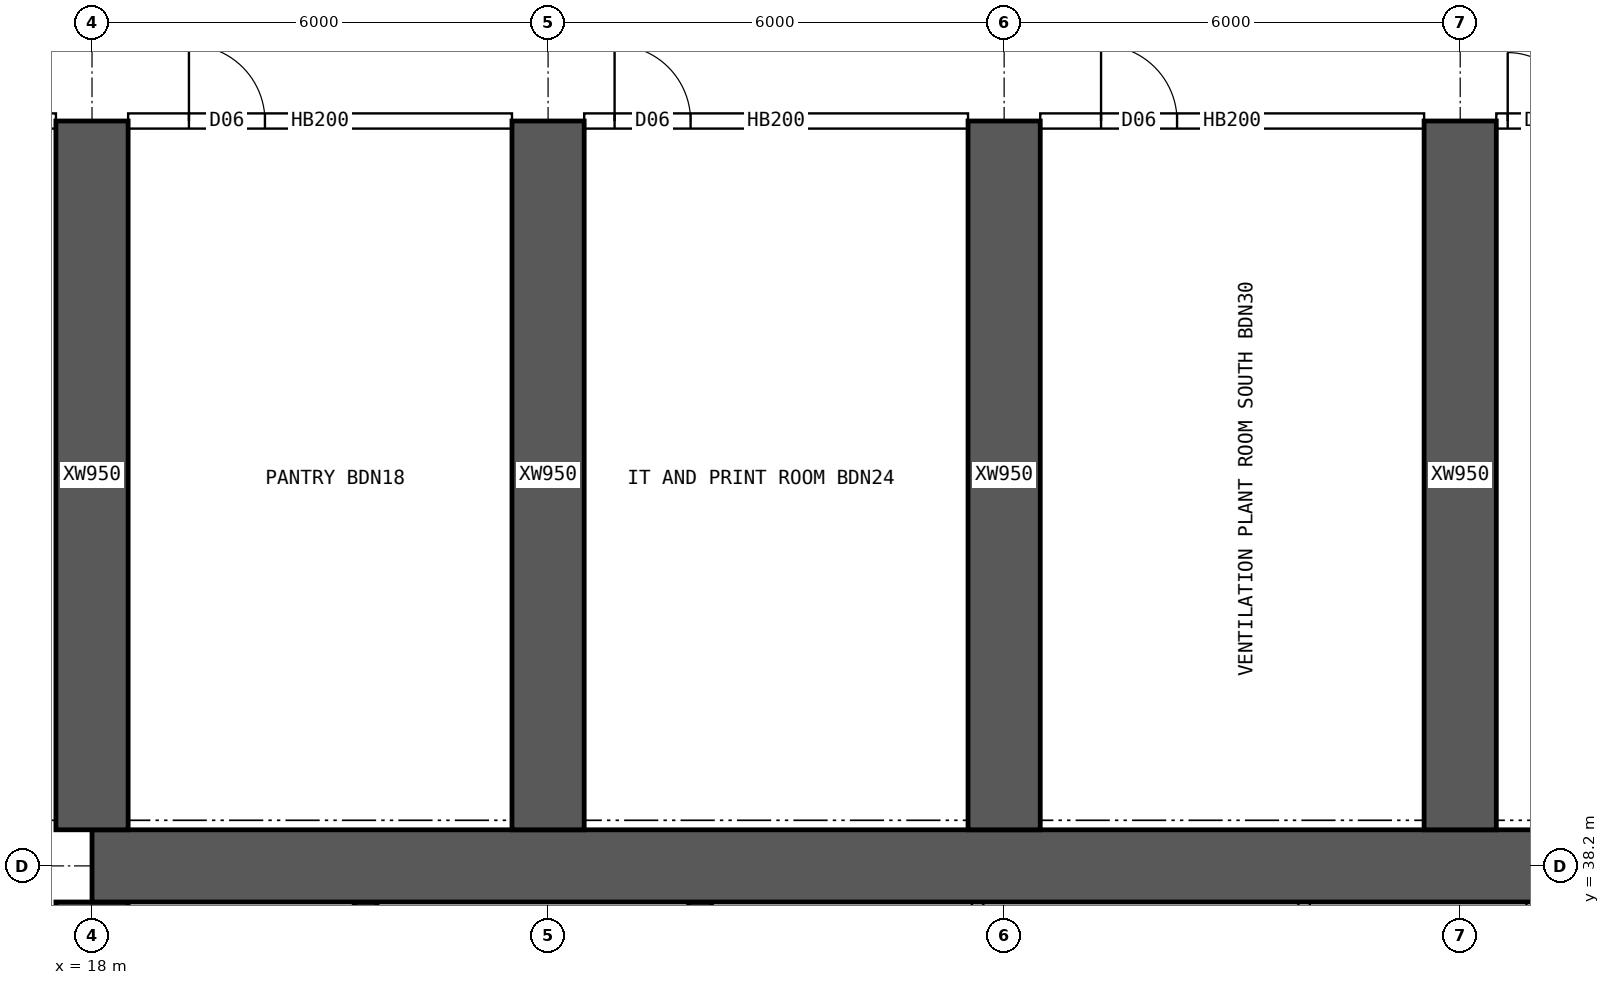
"""IFC4 building model, lengths in metres.
Left out: names, types, materials, properties, quantities, classifications, styles, units other than length and angle.
Written with IfcOpenShell. Run it as: python <this file> out.ifc"""

import sys

from ifc_helpers import new_model, si_unit, direction, frame, frame_2d, origin, place, context, subcontext, project, spatial, rectangle, extrude, element, fill, save


model = new_model("IFC4")
c1 = context("Model", 3, precision=1e-05, world=origin(), true_north=direction((0.0, 1.0)))
c2 = subcontext(c1, "Body", "Model", "MODEL_VIEW")
j1 = project(units=[si_unit("LENGTHUNIT", "METRE"), si_unit("PLANEANGLEUNIT", "RADIAN")], contexts=[c1])
p1 = place(None, origin())
s1 = spatial("IfcSite", under=j1, at=p1, CompositionType="ELEMENT")
p2 = place(p1, origin())
s2 = spatial("IfcBuilding", under=s1, at=p2, CompositionType="ELEMENT")
p3 = place(p2, frame((0.0, 0.0, 84.4)))
s3 = spatial("IfcBuildingStorey", under=s2, at=p3, CompositionType="ELEMENT", Elevation=84.4)
p4 = place(p3, frame((18.0, 38.2, 0.0), z_axis=(0.0, 0.0, 1.0), x_axis=(1.0, 0.0, 0.0)))
e1 = element("IfcWall", 1, at=p4, inside=s3, PredefinedType="SHEAR", context=c2, shape_type="SweptSolid", body=[
    extrude(rectangle(XDim=48.0, YDim=0.95, at=frame_2d((24.0, 0.0))), origin(), (0.0, 0.0, 1.0), 3.75),
])
p5 = place(p3, frame((18.0, 26.275, 0.0), z_axis=(0.0, 0.0, 1.0), x_axis=(0.0, 1.0, 0.0)))
e2 = element("IfcWall", 2, at=p5, inside=s3, PredefinedType="SHEAR", context=c2, shape_type="SweptSolid", body=[
    extrude(rectangle(XDim=11.45, YDim=0.95, at=frame_2d((5.725, 0.0))), origin(), (0.0, 0.0, 1.0), 3.75),
])
p6 = place(p5, frame((5.025, 0.0, 0.0)))
e3 = element("IfcOpeningElement", 3, at=p6, cuts=e2, PredefinedType="OPENING", context=c2, shape_type="SweptSolid", body=[
    extrude(rectangle(XDim=1.2, YDim=2.1, at=frame_2d((0.6, 1.05))), frame((0.0, 0.485, 0.0), z_axis=(0.0, -1.0, 0.0), x_axis=(1.0, 0.0, 0.0)), (0.0, 0.0, 1.0), 0.97),
])
for number, where, z_axis, x_axis in (
    (4, (21.6, 34.75, 0.0), (0.0, 0.0, 1.0), (0.0, 1.0, 0.0)),
    (5, (26.0, 34.75, 0.0), (0.0, 0.0, 1.0), (0.0, 1.0, 0.0)),
):
    element("IfcWall", number, at=place(p3, frame(where, z_axis=z_axis, x_axis=x_axis)), inside=s3, PredefinedType="SHEAR", context=c2, shape_type="SweptSolid", body=[
        extrude(rectangle(XDim=2.975, YDim=0.3, at=frame_2d((1.488, 0.0))), origin(), (0.0, 0.0, 1.0), 3.75),
    ])
for number, where, z_axis, x_axis in (
    (6, (18.0, 38.675, 0.0), (0.0, 0.0, 1.0), (0.0, 1.0, 0.0)),
    (7, (24.0, 38.675, 0.0), (0.0, 0.0, 1.0), (0.0, 1.0, 0.0)),
    (8, (30.0, 38.675, 0.0), (0.0, 0.0, 1.0), (0.0, 1.0, 0.0)),
    (9, (36.0, 38.675, 0.0), (0.0, 0.0, 1.0), (0.0, 1.0, 0.0)),
):
    element("IfcWall", number, at=place(p3, frame(where, z_axis=z_axis, x_axis=x_axis)), inside=s3, PredefinedType="SHEAR", context=c2, shape_type="SweptSolid", body=[
        extrude(rectangle(XDim=9.325, YDim=0.95, at=frame_2d((4.663, 0.0))), origin(), (0.0, 0.0, 1.0), 3.75),
    ])
for number, where, z_axis, x_axis in (
    (10, (29.651, 34.75, 0.0), (0.0, 0.0, 1.0), (0.0, 1.0, 0.0)),
    (11, (33.946, 34.75, 0.0), (0.0, 0.0, 1.0), (0.0, 1.0, 0.0)),
    (12, (36.946, 34.75, 0.0), (0.0, 0.0, 1.0), (0.0, 1.0, 0.0)),
):
    element("IfcWall", number, at=place(p3, frame(where, z_axis=z_axis, x_axis=x_axis)), inside=s3, PredefinedType="SOLIDWALL", context=c2, shape_type="SweptSolid", body=[
        extrude(rectangle(XDim=2.975, YDim=0.15, at=frame_2d((1.488, 0.0))), origin(), (0.0, 0.0, 1.0), 3.5),
    ])
p7 = place(p3, frame((12.475, 48.0, 0.0), z_axis=(0.0, 0.0, 1.0), x_axis=(1.0, 0.0, 0.0)))
e13 = element("IfcWall", 13, at=p7, inside=s3, PredefinedType="SOLIDWALL", context=c2, shape_type="SweptSolid", body=[
    extrude(rectangle(XDim=5.05, YDim=0.2, at=frame_2d((2.525, 0.0))), origin(), (0.0, 0.0, 1.0), 3.5),
])
p8 = place(p7, frame((3.325, 0.0, 0.0)))
e14 = element("IfcOpeningElement", 14, at=p8, cuts=e13, PredefinedType="OPENING", context=c2, shape_type="SweptSolid", body=[
    extrude(rectangle(XDim=1.6, YDim=2.1, at=frame_2d((0.8, 1.05))), frame((0.0, 0.11, 0.0), z_axis=(0.0, -1.0, 0.0), x_axis=(1.0, 0.0, 0.0)), (0.0, 0.0, 1.0), 0.22),
])
p9 = place(p3, frame((18.475, 48.0, 0.0), z_axis=(0.0, 0.0, 1.0), x_axis=(1.0, 0.0, 0.0)))
e15 = element("IfcWall", 15, at=p9, inside=s3, PredefinedType="SOLIDWALL", context=c2, shape_type="SweptSolid", body=[
    extrude(rectangle(XDim=5.05, YDim=0.2, at=frame_2d((2.525, 0.0))), origin(), (0.0, 0.0, 1.0), 3.5),
])
p10 = place(p9, frame((0.8, 0.0, 0.0)))
e16 = element("IfcOpeningElement", 16, at=p10, cuts=e15, PredefinedType="OPENING", context=c2, shape_type="SweptSolid", body=[
    extrude(rectangle(XDim=1.0, YDim=2.1, at=frame_2d((0.5, 1.05))), frame((0.0, 0.11, 0.0), z_axis=(0.0, -1.0, 0.0), x_axis=(1.0, 0.0, 0.0)), (0.0, 0.0, 1.0), 0.22),
])
p11 = place(p3, frame((24.475, 48.0, 0.0), z_axis=(0.0, 0.0, 1.0), x_axis=(1.0, 0.0, 0.0)))
e17 = element("IfcWall", 17, at=p11, inside=s3, PredefinedType="SOLIDWALL", context=c2, shape_type="SweptSolid", body=[
    extrude(rectangle(XDim=5.05, YDim=0.2, at=frame_2d((2.525, 0.0))), origin(), (0.0, 0.0, 1.0), 3.5),
])
p12 = place(p11, frame((0.4, 0.0, 0.0)))
e18 = element("IfcOpeningElement", 18, at=p12, cuts=e17, PredefinedType="OPENING", context=c2, shape_type="SweptSolid", body=[
    extrude(rectangle(XDim=1.0, YDim=2.1, at=frame_2d((0.5, 1.05))), frame((0.0, 0.11, 0.0), z_axis=(0.0, -1.0, 0.0), x_axis=(1.0, 0.0, 0.0)), (0.0, 0.0, 1.0), 0.22),
])
p13 = place(p3, frame((30.475, 48.0, 0.0), z_axis=(0.0, 0.0, 1.0), x_axis=(1.0, 0.0, 0.0)))
e19 = element("IfcWall", 19, at=p13, inside=s3, PredefinedType="SOLIDWALL", context=c2, shape_type="SweptSolid", body=[
    extrude(rectangle(XDim=5.05, YDim=0.2, at=frame_2d((2.525, 0.0))), origin(), (0.0, 0.0, 1.0), 3.5),
])
p14 = place(p13, frame((0.8, 0.0, 0.0)))
e20 = element("IfcOpeningElement", 20, at=p14, cuts=e19, PredefinedType="OPENING", context=c2, shape_type="SweptSolid", body=[
    extrude(rectangle(XDim=1.0, YDim=2.1, at=frame_2d((0.5, 1.05))), frame((0.0, 0.11, 0.0), z_axis=(0.0, -1.0, 0.0), x_axis=(1.0, 0.0, 0.0)), (0.0, 0.0, 1.0), 0.22),
])
p15 = place(p3, frame((36.475, 48.0, 0.0), z_axis=(0.0, 0.0, 1.0), x_axis=(1.0, 0.0, 0.0)))
e21 = element("IfcWall", 21, at=p15, inside=s3, PredefinedType="SOLIDWALL", context=c2, shape_type="SweptSolid", body=[
    extrude(rectangle(XDim=5.05, YDim=0.2, at=frame_2d((2.525, 0.0))), origin(), (0.0, 0.0, 1.0), 3.5),
])
p16 = place(p15, frame((0.15, 0.0, 0.0)))
e22 = element("IfcOpeningElement", 22, at=p16, cuts=e21, PredefinedType="OPENING", context=c2, shape_type="SweptSolid", body=[
    extrude(rectangle(XDim=0.9, YDim=2.1, at=frame_2d((0.45, 1.05))), frame((0.0, 0.11, 0.0), z_axis=(0.0, -1.0, 0.0), x_axis=(1.0, 0.0, 0.0)), (0.0, 0.0, 1.0), 0.22),
])
p17 = place(p15, frame((3.525, 0.0, 0.0)))
e23 = element("IfcOpeningElement", 23, at=p17, cuts=e21, PredefinedType="OPENING", context=c2, shape_type="SweptSolid", body=[
    extrude(rectangle(XDim=0.9, YDim=2.1, at=frame_2d((0.45, 1.05))), frame((0.0, 0.11, 0.0), z_axis=(0.0, -1.0, 0.0), x_axis=(1.0, 0.0, 0.0)), (0.0, 0.0, 1.0), 0.22),
])
p18 = place(p10, origin())
e24 = element("IfcDoor", 24, at=p18, inside=s3, OperationType="SINGLE_SWING_LEFT", PredefinedType="DOOR", context=c2, shape_type="SweptSolid", body=[
    extrude(rectangle(XDim=1.0, YDim=2.1, at=frame_2d((0.5, 1.05))), frame((0.0, 0.025, 0.0), z_axis=(0.0, -1.0, 0.0), x_axis=(1.0, 0.0, 0.0)), (0.0, 0.0, 1.0), 0.05),
])
fill(e16, e24)
p19 = place(p12, origin())
e25 = element("IfcDoor", 25, at=p19, inside=s3, OperationType="SINGLE_SWING_LEFT", PredefinedType="DOOR", context=c2, shape_type="SweptSolid", body=[
    extrude(rectangle(XDim=1.0, YDim=2.1, at=frame_2d((0.5, 1.05))), frame((0.0, 0.025, 0.0), z_axis=(0.0, -1.0, 0.0), x_axis=(1.0, 0.0, 0.0)), (0.0, 0.0, 1.0), 0.05),
])
fill(e18, e25)
p20 = place(p14, origin())
e26 = element("IfcDoor", 26, at=p20, inside=s3, OperationType="SINGLE_SWING_LEFT", PredefinedType="DOOR", context=c2, shape_type="SweptSolid", body=[
    extrude(rectangle(XDim=1.0, YDim=2.1, at=frame_2d((0.5, 1.05))), frame((0.0, 0.025, 0.0), z_axis=(0.0, -1.0, 0.0), x_axis=(1.0, 0.0, 0.0)), (0.0, 0.0, 1.0), 0.05),
])
fill(e20, e26)
p21 = place(p16, origin())
e27 = element("IfcDoor", 27, at=p21, inside=s3, OperationType="SINGLE_SWING_LEFT", PredefinedType="DOOR", context=c2, shape_type="SweptSolid", body=[
    extrude(rectangle(XDim=0.9, YDim=2.1, at=frame_2d((0.45, 1.05))), frame((0.0, 0.025, 0.0), z_axis=(0.0, -1.0, 0.0), x_axis=(1.0, 0.0, 0.0)), (0.0, 0.0, 1.0), 0.05),
])
fill(e22, e27)
save(model, sys.argv[1])
